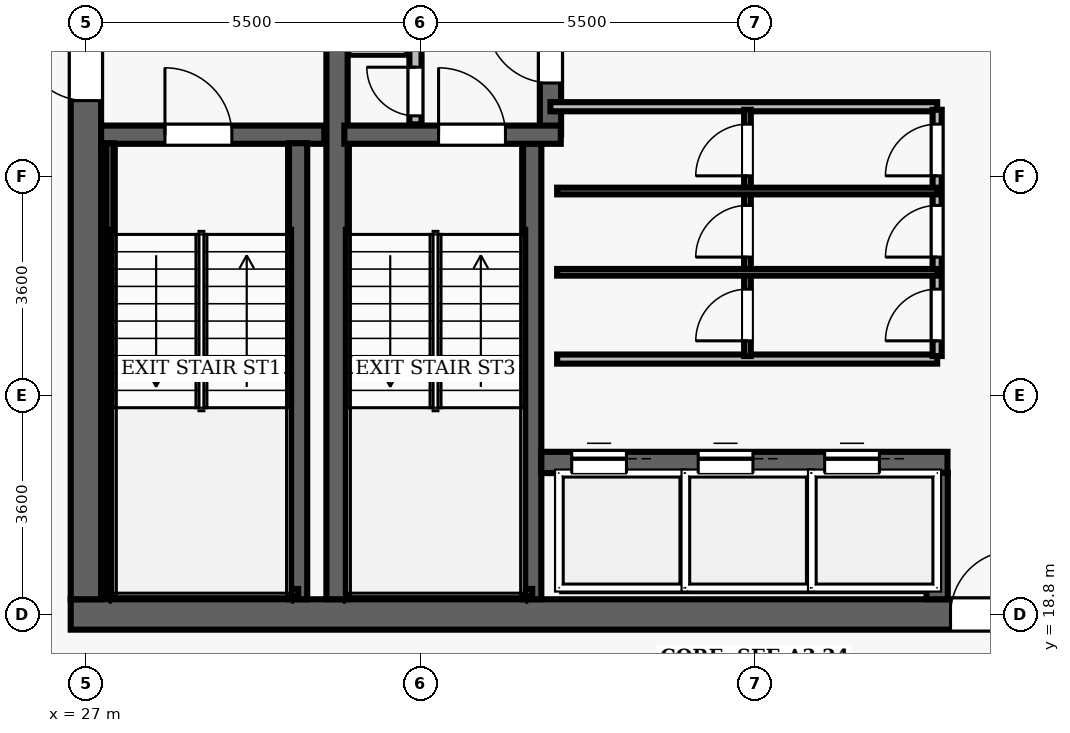
"""IFC4 building model, lengths in metres.
Left out: names, types, materials, properties, quantities, classifications, styles, units other than length and angle.
Written with IfcOpenShell. Run it as: python <this file> out.ifc"""

import sys

from ifc_helpers import new_model, si_unit, direction, frame, frame_2d, origin, place, context, subcontext, project, spatial, rectangle, extrude, element, fill, save


model = new_model("IFC4")
c1 = context("Model", 3, precision=1e-05, world=origin(), true_north=direction((0.0, 1.0)))
c2 = subcontext(c1, "Body", "Model", "MODEL_VIEW")
j1 = project(units=[si_unit("LENGTHUNIT", "METRE"), si_unit("PLANEANGLEUNIT", "RADIAN")], contexts=[c1])
p1 = place(None, origin())
s1 = spatial("IfcSite", under=j1, at=p1, CompositionType="ELEMENT")
p2 = place(p1, origin())
s2 = spatial("IfcBuilding", under=s1, at=p2, CompositionType="ELEMENT")
p3 = place(p2, frame((0.0, 0.0, 221.25)))
s3 = spatial("IfcBuildingStorey", under=s2, at=p3, CompositionType="ELEMENT", Elevation=221.25)
p4 = place(p3, frame((26.75, 18.8, 0.0), z_axis=(0.0, 0.0, 1.0), x_axis=(1.0, 0.0, 0.0)))
e1 = element("IfcWall", 1, at=p4, inside=s3, PredefinedType="SHEAR", context=c2, shape_type="SweptSolid", body=[
    extrude(rectangle(XDim=22.5, YDim=0.5, at=frame_2d((11.25, 0.0))), origin(), (0.0, 0.0, 1.0), 3.85),
])
p5 = place(p4, frame((14.47, 0.0, 0.0)))
e2 = element("IfcOpeningElement", 2, at=p5, cuts=e1, PredefinedType="OPENING", context=c2, shape_type="SweptSolid", body=[
    extrude(rectangle(XDim=1.05, YDim=2.15, at=frame_2d((0.525, 1.075))), frame((0.0, 0.26, 0.0), z_axis=(0.0, -1.0, 0.0), x_axis=(1.0, 0.0, 0.0)), (0.0, 0.0, 1.0), 0.52),
])
p6 = place(p3, frame((27.0, 19.05, 0.0), z_axis=(0.0, 0.0, 1.0), x_axis=(0.0, 1.0, 0.0)))
e3 = element("IfcWall", 3, at=p6, inside=s3, PredefinedType="SHEAR", context=c2, shape_type="SweptSolid", body=[
    extrude(rectangle(XDim=13.9, YDim=0.5, at=frame_2d((6.95, 0.0))), origin(), (0.0, 0.0, 1.0), 3.85),
])
p7 = place(p6, frame((8.2, 0.0, 0.0)))
e4 = element("IfcOpeningElement", 4, at=p7, cuts=e3, PredefinedType="OPENING", context=c2, shape_type="SweptSolid", body=[
    extrude(rectangle(XDim=1.05, YDim=2.15, at=frame_2d((0.525, 1.075))), frame((0.0, 0.26, 0.0), z_axis=(0.0, -1.0, 0.0), x_axis=(1.0, 0.0, 0.0)), (0.0, 0.0, 1.0), 0.52),
])
p8 = place(p3, frame((31.13, 19.05, 0.0), z_axis=(0.0, 0.0, 1.0), x_axis=(0.0, 1.0, 0.0)))
e5 = element("IfcWall", 5, at=p8, inside=s3, PredefinedType="SHEAR", context=c2, shape_type="SweptSolid", body=[
    extrude(rectangle(XDim=13.9, YDim=0.35, at=frame_2d((6.95, 0.0))), origin(), (0.0, 0.0, 1.0), 3.85),
])
p9 = place(p3, frame((27.25, 26.69, 0.0), z_axis=(0.0, 0.0, 1.0), x_axis=(1.0, 0.0, 0.0)))
e6 = element("IfcWall", 6, at=p9, inside=s3, PredefinedType="SHEAR", context=c2, shape_type="SweptSolid", body=[
    extrude(rectangle(XDim=3.67, YDim=0.3, at=frame_2d((1.835, 0.0))), origin(), (0.0, 0.0, 1.0), 3.85),
])
p10 = place(p9, frame((1.05, 0.0, 0.0)))
e7 = element("IfcOpeningElement", 7, at=p10, cuts=e6, PredefinedType="OPENING", context=c2, shape_type="SweptSolid", body=[
    extrude(rectangle(XDim=1.1, YDim=2.15, at=frame_2d((0.55, 1.075))), frame((0.0, 0.16, 0.0), z_axis=(0.0, -1.0, 0.0), x_axis=(1.0, 0.0, 0.0)), (0.0, 0.0, 1.0), 0.32),
])
p11 = place(p3, frame((30.49, 19.05, 0.0), z_axis=(0.0, 0.0, 1.0), x_axis=(0.0, 1.0, 0.0)))
e8 = element("IfcWall", 8, at=p11, inside=s3, PredefinedType="SHEAR", context=c2, shape_type="SweptSolid", body=[
    extrude(rectangle(XDim=7.5, YDim=0.3, at=frame_2d((3.75, 0.0))), origin(), (0.0, 0.0, 1.0), 3.85),
])
p12 = place(p3, frame((27.395, 19.1, 0.0), z_axis=(0.0, 0.0, 1.0), x_axis=(0.0, 1.0, 0.0)))
e9 = element("IfcWall", 9, at=p12, inside=s3, PredefinedType="SHEAR", context=c2, shape_type="SweptSolid", body=[
    extrude(rectangle(XDim=7.45, YDim=0.12, at=frame_2d((3.725, 0.0))), origin(), (0.0, 0.0, 1.0), 3.85),
])
p13 = place(p3, frame((27.395, 19.16, 0.0), z_axis=(0.0, 0.0, 1.0), x_axis=(1.0, 0.0, 0.0)))
e10 = element("IfcWall", 10, at=p13, inside=s3, PredefinedType="SHEAR", context=c2, shape_type="SweptSolid", body=[
    extrude(rectangle(XDim=3.095, YDim=0.12, at=frame_2d((1.547, 0.0))), origin(), (0.0, 0.0, 1.0), 3.85),
])
p14 = place(p3, frame((34.34, 19.05, 0.0), z_axis=(0.0, 0.0, 1.0), x_axis=(0.0, 1.0, 0.0)))
e11 = element("IfcWall", 11, at=p14, inside=s3, PredefinedType="SHEAR", context=c2, shape_type="SweptSolid", body=[
    extrude(rectangle(XDim=7.5, YDim=0.3, at=frame_2d((3.75, 0.0))), origin(), (0.0, 0.0, 1.0), 3.85),
])
p15 = place(p3, frame((34.64, 26.69, 0.0), z_axis=(0.0, 0.0, 1.0), x_axis=(0.0, 1.0, 0.0)))
e12 = element("IfcWall", 12, at=p15, inside=s3, PredefinedType="SHEAR", context=c2, shape_type="SweptSolid", body=[
    extrude(rectangle(XDim=6.26, YDim=0.35, at=frame_2d((3.13, 0.0))), origin(), (0.0, 0.0, 1.0), 3.85),
])
p16 = place(p15, frame((0.85, 0.0, 0.0)))
e13 = element("IfcOpeningElement", 13, at=p16, cuts=e12, PredefinedType="OPENING", context=c2, shape_type="SweptSolid", body=[
    extrude(rectangle(XDim=1.05, YDim=2.15, at=frame_2d((0.525, 1.075))), frame((0.0, 0.185, 0.0), z_axis=(0.0, -1.0, 0.0), x_axis=(1.0, 0.0, 0.0)), (0.0, 0.0, 1.0), 0.37),
])
p17 = place(p3, frame((31.25, 26.69, 0.0), z_axis=(0.0, 0.0, 1.0), x_axis=(1.0, 0.0, 0.0)))
e14 = element("IfcWall", 14, at=p17, inside=s3, PredefinedType="SHEAR", context=c2, shape_type="SweptSolid", body=[
    extrude(rectangle(XDim=3.56, YDim=0.3, at=frame_2d((1.78, 0.0))), origin(), (0.0, 0.0, 1.0), 3.85),
])
p18 = place(p17, frame((1.55, 0.0, 0.0)))
e15 = element("IfcOpeningElement", 15, at=p18, cuts=e14, PredefinedType="OPENING", context=c2, shape_type="SweptSolid", body=[
    extrude(rectangle(XDim=1.1, YDim=2.15, at=frame_2d((0.55, 1.075))), frame((0.0, 0.16, 0.0), z_axis=(0.0, -1.0, 0.0), x_axis=(1.0, 0.0, 0.0)), (0.0, 0.0, 1.0), 0.32),
])
p19 = place(p3, frame((31.3, 19.16, 0.0), z_axis=(0.0, 0.0, 1.0), x_axis=(1.0, 0.0, 0.0)))
e16 = element("IfcWall", 16, at=p19, inside=s3, PredefinedType="SHEAR", context=c2, shape_type="SweptSolid", body=[
    extrude(rectangle(XDim=3.04, YDim=0.12, at=frame_2d((1.52, 0.0))), origin(), (0.0, 0.0, 1.0), 3.85),
])
p20 = place(p3, frame((32.42, 26.86, 0.0), z_axis=(0.0, 0.0, 1.0), x_axis=(0.0, 1.0, 0.0)))
e17 = element("IfcWall", 17, at=p20, inside=s3, PredefinedType="PARTITIONING", context=c2, shape_type="SweptSolid", body=[
    extrude(rectangle(XDim=2.04, YDim=0.2, at=frame_2d((1.02, 0.0))), origin(), (0.0, 0.0, 1.0), 3.035),
])
p21 = place(p20, frame((0.14, 0.0, 0.0)))
e18 = element("IfcOpeningElement", 18, at=p21, cuts=e17, PredefinedType="OPENING", context=c2, shape_type="SweptSolid", body=[
    extrude(rectangle(XDim=0.8, YDim=2.05, at=frame_2d((0.4, 1.025))), frame((0.0, 0.11, 0.0), z_axis=(0.0, -1.0, 0.0), x_axis=(1.0, 0.0, 0.0)), (0.0, 0.0, 1.0), 0.22),
])
p22 = place(p3, frame((34.49, 21.3, 0.0), z_axis=(0.0, 0.0, 1.0), x_axis=(1.0, 0.0, 0.0)))
e19 = element("IfcWall", 19, at=p22, inside=s3, PredefinedType="SHEAR", context=c2, shape_type="SweptSolid", body=[
    extrude(rectangle(XDim=6.68, YDim=0.35, at=frame_2d((3.34, 0.0))), origin(), (0.0, 0.0, 1.0), 3.035),
])
p23 = place(p22, frame((0.5, 0.0, 0.0)))
e20 = element("IfcOpeningElement", 20, at=p23, cuts=e19, PredefinedType="OPENING", context=c2, shape_type="SweptSolid", body=[
    extrude(rectangle(XDim=0.9, YDim=2.15, at=frame_2d((0.45, 1.075))), frame((0.0, 0.185, 0.0), z_axis=(0.0, -1.0, 0.0), x_axis=(1.0, 0.0, 0.0)), (0.0, 0.0, 1.0), 0.37),
])
p24 = place(p22, frame((2.58, 0.0, 0.0)))
e21 = element("IfcOpeningElement", 21, at=p24, cuts=e19, PredefinedType="OPENING", context=c2, shape_type="SweptSolid", body=[
    extrude(rectangle(XDim=0.9, YDim=2.15, at=frame_2d((0.45, 1.075))), frame((0.0, 0.185, 0.0), z_axis=(0.0, -1.0, 0.0), x_axis=(1.0, 0.0, 0.0)), (0.0, 0.0, 1.0), 0.37),
])
p25 = place(p22, frame((4.66, 0.0, 0.0)))
e22 = element("IfcOpeningElement", 22, at=p25, cuts=e19, PredefinedType="OPENING", context=c2, shape_type="SweptSolid", body=[
    extrude(rectangle(XDim=0.9, YDim=2.15, at=frame_2d((0.45, 1.075))), frame((0.0, 0.185, 0.0), z_axis=(0.0, -1.0, 0.0), x_axis=(1.0, 0.0, 0.0)), (0.0, 0.0, 1.0), 0.37),
])
p26 = place(p3, frame((41.0, 19.05, 0.0), z_axis=(0.0, 0.0, 1.0), x_axis=(0.0, 1.0, 0.0)))
e23 = element("IfcWall", 23, at=p26, inside=s3, PredefinedType="SHEAR", context=c2, shape_type="SweptSolid", body=[
    extrude(rectangle(XDim=2.08, YDim=0.35, at=frame_2d((1.04, 0.0))), origin(), (0.0, 0.0, 1.0), 3.035),
])
p27 = place(p3, frame((34.75, 23.0, 0.0), z_axis=(0.0, 0.0, 1.0), x_axis=(1.0, 0.0, 0.0)))
e24 = element("IfcWall", 24, at=p27, inside=s3, PredefinedType="PARTITIONING", context=c2, shape_type="SweptSolid", body=[
    extrude(rectangle(XDim=6.25, YDim=0.15, at=frame_2d((3.125, 0.0))), origin(), (0.0, 0.0, 1.0), 3.035),
])
p28 = place(p3, frame((34.64, 27.15, 0.0), z_axis=(0.0, 0.0, 1.0), x_axis=(1.0, 0.0, 0.0)))
e25 = element("IfcWall", 25, at=p28, inside=s3, PredefinedType="PARTITIONING", context=c2, shape_type="SweptSolid", body=[
    extrude(rectangle(XDim=6.36, YDim=0.15, at=frame_2d((3.18, 0.0))), origin(), (0.0, 0.0, 1.0), 3.035),
])
p29 = place(p3, frame((41.0, 23.05, 0.0), z_axis=(0.0, 0.0, 1.0), x_axis=(0.0, 1.0, 0.0)))
e26 = element("IfcWall", 26, at=p29, inside=s3, PredefinedType="PARTITIONING", context=c2, shape_type="SweptSolid", body=[
    extrude(rectangle(XDim=4.05, YDim=0.15, at=frame_2d((2.025, 0.0))), origin(), (0.0, 0.0, 1.0), 3.035),
])
p30 = place(p29, frame((0.25, 0.0, 0.0)))
e27 = element("IfcOpeningElement", 27, at=p30, cuts=e26, PredefinedType="OPENING", context=c2, shape_type="SweptSolid", body=[
    extrude(rectangle(XDim=0.85, YDim=2.1, at=frame_2d((0.425, 1.05))), frame((0.0, 0.085, 0.0), z_axis=(0.0, -1.0, 0.0), x_axis=(1.0, 0.0, 0.0)), (0.0, 0.0, 1.0), 0.17),
])
p31 = place(p29, frame((1.627, 0.0, 0.0)))
e28 = element("IfcOpeningElement", 28, at=p31, cuts=e26, PredefinedType="OPENING", context=c2, shape_type="SweptSolid", body=[
    extrude(rectangle(XDim=0.85, YDim=2.1, at=frame_2d((0.425, 1.05))), frame((0.0, 0.085, 0.0), z_axis=(0.0, -1.0, 0.0), x_axis=(1.0, 0.0, 0.0)), (0.0, 0.0, 1.0), 0.17),
])
p32 = place(p29, frame((2.963, 0.0, 0.0)))
e29 = element("IfcOpeningElement", 29, at=p32, cuts=e26, PredefinedType="OPENING", context=c2, shape_type="SweptSolid", body=[
    extrude(rectangle(XDim=0.85, YDim=2.1, at=frame_2d((0.425, 1.05))), frame((0.0, 0.085, 0.0), z_axis=(0.0, -1.0, 0.0), x_axis=(1.0, 0.0, 0.0)), (0.0, 0.0, 1.0), 0.17),
])
p33 = place(p3, frame((37.88, 23.05, 0.0), z_axis=(0.0, 0.0, 1.0), x_axis=(0.0, 1.0, 0.0)))
e30 = element("IfcWall", 30, at=p33, inside=s3, PredefinedType="PARTITIONING", context=c2, shape_type="SweptSolid", body=[
    extrude(rectangle(XDim=4.05, YDim=0.11, at=frame_2d((2.025, 0.0))), origin(), (0.0, 0.0, 1.0), 3.035),
])
p34 = place(p33, frame((0.25, 0.0, 0.0)))
e31 = element("IfcOpeningElement", 31, at=p34, cuts=e30, PredefinedType="OPENING", context=c2, shape_type="SweptSolid", body=[
    extrude(rectangle(XDim=0.85, YDim=2.1, at=frame_2d((0.425, 1.05))), frame((0.0, 0.065, 0.0), z_axis=(0.0, -1.0, 0.0), x_axis=(1.0, 0.0, 0.0)), (0.0, 0.0, 1.0), 0.13),
])
p35 = place(p33, frame((1.627, 0.0, 0.0)))
e32 = element("IfcOpeningElement", 32, at=p35, cuts=e30, PredefinedType="OPENING", context=c2, shape_type="SweptSolid", body=[
    extrude(rectangle(XDim=0.85, YDim=2.1, at=frame_2d((0.425, 1.05))), frame((0.0, 0.065, 0.0), z_axis=(0.0, -1.0, 0.0), x_axis=(1.0, 0.0, 0.0)), (0.0, 0.0, 1.0), 0.13),
])
p36 = place(p33, frame((2.963, 0.0, 0.0)))
e33 = element("IfcOpeningElement", 33, at=p36, cuts=e30, PredefinedType="OPENING", context=c2, shape_type="SweptSolid", body=[
    extrude(rectangle(XDim=0.85, YDim=2.1, at=frame_2d((0.425, 1.05))), frame((0.0, 0.065, 0.0), z_axis=(0.0, -1.0, 0.0), x_axis=(1.0, 0.0, 0.0)), (0.0, 0.0, 1.0), 0.13),
])
for number, where, z_axis, x_axis in (
    (34, (34.75, 24.427, 0.0), (0.0, 0.0, 1.0), (1.0, 0.0, 0.0)),
    (35, (34.75, 25.763, 0.0), (0.0, 0.0, 1.0), (1.0, 0.0, 0.0)),
):
    element("IfcWall", number, at=place(p3, frame(where, z_axis=z_axis, x_axis=x_axis)), inside=s3, PredefinedType="PARTITIONING", context=c2, shape_type="SweptSolid", body=[
        extrude(rectangle(XDim=6.25, YDim=0.11, at=frame_2d((3.125, 0.0))), origin(), (0.0, 0.0, 1.0), 3.035),
    ])
p37 = place(p10, origin())
e36 = element("IfcDoor", 36, at=p37, inside=s3, OperationType="SINGLE_SWING_LEFT", PredefinedType="DOOR", context=c2, shape_type="SweptSolid", body=[
    extrude(rectangle(XDim=1.1, YDim=2.15, at=frame_2d((0.55, 1.075))), frame((0.0, 0.025, 0.0), z_axis=(0.0, -1.0, 0.0), x_axis=(1.0, 0.0, 0.0)), (0.0, 0.0, 1.0), 0.05),
])
fill(e7, e36)
p38 = place(p7, origin())
e37 = element("IfcDoor", 37, at=p38, inside=s3, OperationType="SINGLE_SWING_RIGHT", PredefinedType="DOOR", context=c2, shape_type="SweptSolid", body=[
    extrude(rectangle(XDim=1.05, YDim=2.15, at=frame_2d((0.525, 1.075))), frame((0.0, 0.025, 0.0), z_axis=(0.0, -1.0, 0.0), x_axis=(1.0, 0.0, 0.0)), (0.0, 0.0, 1.0), 0.05),
])
fill(e4, e37)
p39 = place(p18, origin())
e38 = element("IfcDoor", 38, at=p39, inside=s3, OperationType="SINGLE_SWING_LEFT", PredefinedType="DOOR", context=c2, shape_type="SweptSolid", body=[
    extrude(rectangle(XDim=1.1, YDim=2.15, at=frame_2d((0.55, 1.075))), frame((0.0, 0.025, 0.0), z_axis=(0.0, -1.0, 0.0), x_axis=(1.0, 0.0, 0.0)), (0.0, 0.0, 1.0), 0.05),
])
fill(e15, e38)
p40 = place(p21, origin())
e39 = element("IfcDoor", 39, at=p40, inside=s3, OperationType="SINGLE_SWING_RIGHT", PredefinedType="DOOR", context=c2, shape_type="SweptSolid", body=[
    extrude(rectangle(XDim=0.8, YDim=2.05, at=frame_2d((0.4, 1.025))), frame((0.0, 0.025, 0.0), z_axis=(0.0, -1.0, 0.0), x_axis=(1.0, 0.0, 0.0)), (0.0, 0.0, 1.0), 0.05),
])
fill(e18, e39)
p41 = place(p5, origin())
e40 = element("IfcDoor", 40, at=p41, inside=s3, OperationType="SINGLE_SWING_RIGHT", PredefinedType="DOOR", context=c2, shape_type="SweptSolid", body=[
    extrude(rectangle(XDim=1.05, YDim=2.15, at=frame_2d((0.525, 1.075))), frame((0.0, 0.025, 0.0), z_axis=(0.0, -1.0, 0.0), x_axis=(1.0, 0.0, 0.0)), (0.0, 0.0, 1.0), 0.05),
])
fill(e2, e40)
p42 = place(p16, origin())
e41 = element("IfcDoor", 41, at=p42, inside=s3, OperationType="SINGLE_SWING_RIGHT", PredefinedType="DOOR", context=c2, shape_type="SweptSolid", body=[
    extrude(rectangle(XDim=1.05, YDim=2.15, at=frame_2d((0.525, 1.075))), frame((0.0, 0.025, 0.0), z_axis=(0.0, -1.0, 0.0), x_axis=(1.0, 0.0, 0.0)), (0.0, 0.0, 1.0), 0.05),
])
fill(e13, e41)
p43 = place(p30, origin())
e42 = element("IfcDoor", 42, at=p43, inside=s3, OperationType="SINGLE_SWING_LEFT", PredefinedType="DOOR", context=c2, shape_type="SweptSolid", body=[
    extrude(rectangle(XDim=0.85, YDim=2.1, at=frame_2d((0.425, 1.05))), frame((0.0, 0.025, 0.0), z_axis=(0.0, -1.0, 0.0), x_axis=(1.0, 0.0, 0.0)), (0.0, 0.0, 1.0), 0.05),
])
fill(e27, e42)
p44 = place(p34, origin())
e43 = element("IfcDoor", 43, at=p44, inside=s3, OperationType="SINGLE_SWING_LEFT", PredefinedType="DOOR", context=c2, shape_type="SweptSolid", body=[
    extrude(rectangle(XDim=0.85, YDim=2.1, at=frame_2d((0.425, 1.05))), frame((0.0, 0.025, 0.0), z_axis=(0.0, -1.0, 0.0), x_axis=(1.0, 0.0, 0.0)), (0.0, 0.0, 1.0), 0.05),
])
fill(e31, e43)
p45 = place(p31, origin())
e44 = element("IfcDoor", 44, at=p45, inside=s3, OperationType="SINGLE_SWING_LEFT", PredefinedType="DOOR", context=c2, shape_type="SweptSolid", body=[
    extrude(rectangle(XDim=0.85, YDim=2.1, at=frame_2d((0.425, 1.05))), frame((0.0, 0.025, 0.0), z_axis=(0.0, -1.0, 0.0), x_axis=(1.0, 0.0, 0.0)), (0.0, 0.0, 1.0), 0.05),
])
fill(e28, e44)
p46 = place(p35, origin())
e45 = element("IfcDoor", 45, at=p46, inside=s3, OperationType="SINGLE_SWING_LEFT", PredefinedType="DOOR", context=c2, shape_type="SweptSolid", body=[
    extrude(rectangle(XDim=0.85, YDim=2.1, at=frame_2d((0.425, 1.05))), frame((0.0, 0.025, 0.0), z_axis=(0.0, -1.0, 0.0), x_axis=(1.0, 0.0, 0.0)), (0.0, 0.0, 1.0), 0.05),
])
fill(e32, e45)
p47 = place(p32, origin())
e46 = element("IfcDoor", 46, at=p47, inside=s3, OperationType="SINGLE_SWING_LEFT", PredefinedType="DOOR", context=c2, shape_type="SweptSolid", body=[
    extrude(rectangle(XDim=0.85, YDim=2.1, at=frame_2d((0.425, 1.05))), frame((0.0, 0.025, 0.0), z_axis=(0.0, -1.0, 0.0), x_axis=(1.0, 0.0, 0.0)), (0.0, 0.0, 1.0), 0.05),
])
fill(e29, e46)
p48 = place(p36, origin())
e47 = element("IfcDoor", 47, at=p48, inside=s3, OperationType="SINGLE_SWING_LEFT", PredefinedType="DOOR", context=c2, shape_type="SweptSolid", body=[
    extrude(rectangle(XDim=0.85, YDim=2.1, at=frame_2d((0.425, 1.05))), frame((0.0, 0.025, 0.0), z_axis=(0.0, -1.0, 0.0), x_axis=(1.0, 0.0, 0.0)), (0.0, 0.0, 1.0), 0.05),
])
fill(e33, e47)
p49 = place(p23, origin())
e48 = element("IfcDoor", 48, at=p49, inside=s3, OperationType="SLIDING_TO_LEFT", PredefinedType="DOOR", context=c2, shape_type="SweptSolid", body=[
    extrude(rectangle(XDim=0.9, YDim=2.15, at=frame_2d((0.45, 1.075))), frame((0.0, 0.025, 0.0), z_axis=(0.0, -1.0, 0.0), x_axis=(1.0, 0.0, 0.0)), (0.0, 0.0, 1.0), 0.05),
])
fill(e20, e48)
p50 = place(p24, origin())
e49 = element("IfcDoor", 49, at=p50, inside=s3, OperationType="SLIDING_TO_LEFT", PredefinedType="DOOR", context=c2, shape_type="SweptSolid", body=[
    extrude(rectangle(XDim=0.9, YDim=2.15, at=frame_2d((0.45, 1.075))), frame((0.0, 0.025, 0.0), z_axis=(0.0, -1.0, 0.0), x_axis=(1.0, 0.0, 0.0)), (0.0, 0.0, 1.0), 0.05),
])
fill(e21, e49)
p51 = place(p25, origin())
e50 = element("IfcDoor", 50, at=p51, inside=s3, OperationType="SLIDING_TO_LEFT", PredefinedType="DOOR", context=c2, shape_type="SweptSolid", body=[
    extrude(rectangle(XDim=0.9, YDim=2.15, at=frame_2d((0.45, 1.075))), frame((0.0, 0.025, 0.0), z_axis=(0.0, -1.0, 0.0), x_axis=(1.0, 0.0, 0.0)), (0.0, 0.0, 1.0), 0.05),
])
fill(e22, e50)
save(model, sys.argv[1])
